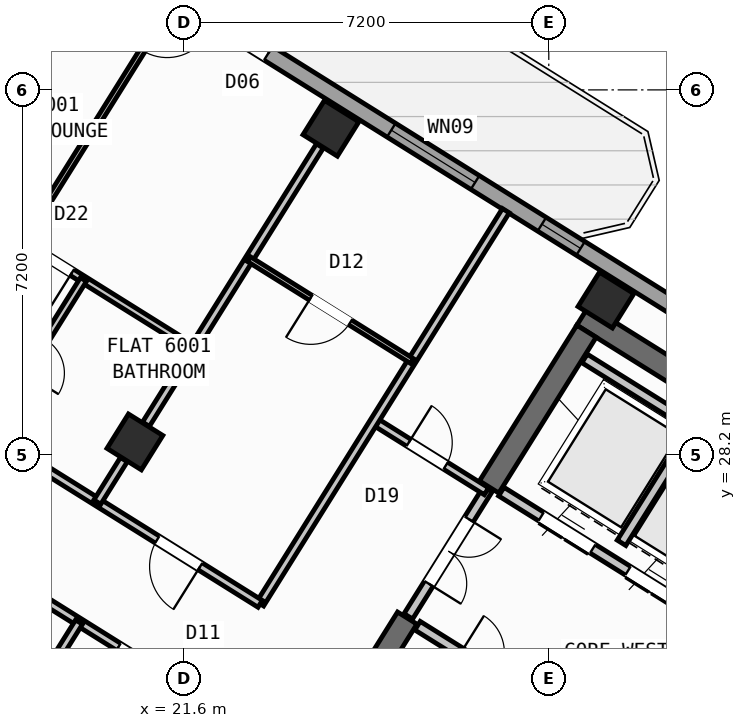
"""IFC4 building model, lengths in metres.
Left out: names, types, materials, properties, quantities, classifications, styles, units other than length and angle.
Written with IfcOpenShell. Run it as: python <this file> out.ifc"""

import sys

from ifc_helpers import new_model, si_unit, direction, frame, frame_2d, origin, origin_2d, place, context, subcontext, project, spatial, rectangle, hollow_rectangle, extrude, source, transform, mapped, element, fill, save


model = new_model("IFC4")
c1 = context("Model", 3, precision=1e-05, world=origin(), true_north=direction((0.0, 1.0)))
c2 = subcontext(c1, "Body", "Model", "MODEL_VIEW")
j1 = project(units=[si_unit("LENGTHUNIT", "METRE"), si_unit("PLANEANGLEUNIT", "RADIAN")], contexts=[c1])
p1 = place(None, origin())
s1 = spatial("IfcSite", under=j1, at=p1, CompositionType="ELEMENT")
p2 = place(p1, origin())
s2 = spatial("IfcBuilding", under=s1, at=p2, CompositionType="ELEMENT")
p3 = place(p2, frame((0.0, 0.0, 238.5)))
s3 = spatial("IfcBuildingStorey", under=s2, at=p3, CompositionType="ELEMENT", Elevation=238.5)
p4 = place(p3, frame((40.531, 24.036, 0.0), z_axis=(0.0, 0.0, 1.0), x_axis=(-0.848048787466, 0.529918157905, 0.0)))
e1 = element("IfcWall", 1, at=p4, inside=s3, PredefinedType="SHEAR", context=c2, shape_type="SweptSolid", body=[
    extrude(rectangle(XDim=13.04, YDim=0.45, at=frame_2d((6.52, 0.0))), origin(), (0.0, 0.0, 1.0), 3.35),
])
p5 = place(p3, frame((29.544, 30.636, 0.0), z_axis=(0.0, 0.0, 1.0), x_axis=(-0.529902075036, -0.848058836916, 0.0)))
e2 = element("IfcWall", 2, at=p5, inside=s3, PredefinedType="SHEAR", context=c2, shape_type="SweptSolid", body=[
    extrude(rectangle(XDim=3.625, YDim=0.45, at=frame_2d((1.812, 0.0))), origin(), (0.0, 0.0, 1.0), 3.35),
])
p6 = place(p3, frame((26.007, 24.976, 0.0), z_axis=(0.0, 0.0, 1.0), x_axis=(-0.529931155655, -0.848040665456, 0.0)))
e3 = element("IfcWall", 3, at=p6, inside=s3, PredefinedType="SHEAR", context=c2, shape_type="SweptSolid", body=[
    extrude(rectangle(XDim=6.475, YDim=0.45, at=frame_2d((3.238, 0.0))), origin(), (0.0, 0.0, 1.0), 3.35),
])
m1 = source(origin(), c2, "Body", "SweptSolid", [
    extrude(hollow_rectangle(XDim=0.8, YDim=0.8, WallThickness=0.032, at=origin_2d()), origin(), (0.0, 0.0, 1.0), 3.6),
])
for number, where, z_axis, x_axis in (
    (4, (29.928, 31.251, 0.0), (0.0, 0.0, 1.0), (-0.848, 0.53, 0.0)),
    (5, (24.5, 34.643, 0.0), (0.0, 0.0, 1.0), (-0.848, 0.53, 0.0)),
    (6, (20.632, 28.452, 0.0), (0.0, 0.0, 1.0), (-0.848, 0.53, 0.0)),
):
    element("IfcColumn", number, at=place(p3, frame(where, z_axis=z_axis, x_axis=x_axis)), inside=s3, PredefinedType="COLUMN", context=c2, shape_type="MappedRepresentation", body=[
        mapped(m1, transform((0.0, 0.0, 0.0), scale=1.0)),
    ])
p7 = place(p3, frame((14.138, 41.825, 0.0), z_axis=(0.0, 0.0, 1.0), x_axis=(0.848046498049, -0.529921821731, 0.0)))
e7 = element("IfcWall", 7, at=p7, inside=s3, PredefinedType="STANDARD", context=c2, shape_type="SweptSolid", body=[
    extrude(rectangle(XDim=31.588, YDim=0.32, at=frame_2d((15.794, 0.0))), origin(), (0.0, 0.0, 1.0), 3.35),
])
p8 = place(p7, frame((9.712, 0.0, 0.0)))
e8 = element("IfcOpeningElement", 8, at=p8, cuts=e7, PredefinedType="OPENING", context=c2, shape_type="SweptSolid", body=[
    extrude(rectangle(XDim=1.05, YDim=2.15, at=frame_2d((0.525, 1.075))), frame((0.0, 0.17, 0.0), z_axis=(0.0, -1.0, 0.0), x_axis=(1.0, 0.0, 0.0)), (0.0, 0.0, 1.0), 0.34),
])
p9 = place(p7, frame((0.841, 0.0, 0.9)))
e9 = element("IfcOpeningElement", 9, at=p9, cuts=e7, PredefinedType="OPENING", context=c2, shape_type="SweptSolid", body=[
    extrude(rectangle(XDim=1.65, YDim=1.45, at=frame_2d((0.825, 0.725))), frame((0.0, 0.17, 0.0), z_axis=(0.0, -1.0, 0.0), x_axis=(1.0, 0.0, 0.0)), (0.0, 0.0, 1.0), 0.34),
])
p10 = place(p7, frame((4.171, 0.0, 1.0)))
e10 = element("IfcOpeningElement", 10, at=p10, cuts=e7, PredefinedType="OPENING", context=c2, shape_type="SweptSolid", body=[
    extrude(rectangle(XDim=0.9, YDim=1.25, at=frame_2d((0.45, 0.625))), frame((0.0, 0.17, 0.0), z_axis=(0.0, -1.0, 0.0), x_axis=(1.0, 0.0, 0.0)), (0.0, 0.0, 1.0), 0.34),
])
p11 = place(p7, frame((13.624, 0.0, 0.95)))
e11 = element("IfcOpeningElement", 11, at=p11, cuts=e7, PredefinedType="OPENING", context=c2, shape_type="SweptSolid", body=[
    extrude(rectangle(XDim=1.95, YDim=1.35, at=frame_2d((0.975, 0.675))), frame((0.0, 0.17, 0.0), z_axis=(0.0, -1.0, 0.0), x_axis=(1.0, 0.0, 0.0)), (0.0, 0.0, 1.0), 0.34),
])
p12 = place(p7, frame((17.129, 0.0, 1.0)))
e12 = element("IfcOpeningElement", 12, at=p12, cuts=e7, PredefinedType="OPENING", context=c2, shape_type="SweptSolid", body=[
    extrude(rectangle(XDim=0.9, YDim=1.25, at=frame_2d((0.45, 0.625))), frame((0.0, 0.17, 0.0), z_axis=(0.0, -1.0, 0.0), x_axis=(1.0, 0.0, 0.0)), (0.0, 0.0, 1.0), 0.34),
])
p13 = place(p7, frame((21.744, 0.0, 0.9)))
e13 = element("IfcOpeningElement", 13, at=p13, cuts=e7, PredefinedType="OPENING", context=c2, shape_type="SweptSolid", body=[
    extrude(rectangle(XDim=1.65, YDim=1.45, at=frame_2d((0.825, 0.725))), frame((0.0, 0.17, 0.0), z_axis=(0.0, -1.0, 0.0), x_axis=(1.0, 0.0, 0.0)), (0.0, 0.0, 1.0), 0.34),
])
p14 = place(p7, frame((27.394, 0.0, 0.9)))
e14 = element("IfcOpeningElement", 14, at=p14, cuts=e7, PredefinedType="OPENING", context=c2, shape_type="SweptSolid", body=[
    extrude(rectangle(XDim=1.65, YDim=1.45, at=frame_2d((0.825, 0.725))), frame((0.0, 0.17, 0.0), z_axis=(0.0, -1.0, 0.0), x_axis=(1.0, 0.0, 0.0)), (0.0, 0.0, 1.0), 0.34),
])
p15 = place(p3, frame((31.822, 24.998, 0.0), z_axis=(0.0, 0.0, 1.0), x_axis=(-0.848054125777, 0.529909614701, 0.0)))
e15 = element("IfcWall", 15, at=p15, inside=s3, PredefinedType="STANDARD", context=c2, shape_type="SweptSolid", body=[
    extrude(rectangle(XDim=4.668, YDim=0.2, at=frame_2d((2.334, 0.0))), origin(), (0.0, 0.0, 1.0), 3.34),
])
p16 = place(p15, frame((0.52, 0.0, 0.0)))
e16 = element("IfcOpeningElement", 16, at=p16, cuts=e15, PredefinedType="OPENING", context=c2, shape_type="SweptSolid", body=[
    extrude(rectangle(XDim=1.2, YDim=2.15, at=frame_2d((0.6, 1.075))), frame((0.0, 0.11, 0.0), z_axis=(0.0, -1.0, 0.0), x_axis=(1.0, 0.0, 0.0)), (0.0, 0.0, 1.0), 0.22),
])
p17 = place(p15, frame((2.54, 0.0, 0.0)))
e17 = element("IfcOpeningElement", 17, at=p17, cuts=e15, PredefinedType="OPENING", context=c2, shape_type="SweptSolid", body=[
    extrude(rectangle(XDim=1.2, YDim=2.15, at=frame_2d((0.6, 1.075))), frame((0.0, 0.11, 0.0), z_axis=(0.0, -1.0, 0.0), x_axis=(1.0, 0.0, 0.0)), (0.0, 0.0, 1.0), 0.22),
])
p18 = place(p3, frame((31.645, 28.716, 0.0), z_axis=(0.0, 0.0, 1.0), x_axis=(-0.52986693015, -0.848080795876, 0.0)))
e18 = element("IfcWall", 18, at=p18, inside=s3, PredefinedType="STANDARD", context=c2, shape_type="SweptSolid", body=[
    extrude(rectangle(XDim=2.66, YDim=0.2, at=frame_2d((1.33, 0.0))), origin(), (0.0, 0.0, 1.0), 3.34),
])
p19 = place(p3, frame((33.363, 27.69, 0.0), z_axis=(0.0, 0.0, 1.0), x_axis=(-0.84804957148, 0.529916903215, 0.0)))
e19 = element("IfcWall", 19, at=p19, inside=s3, PredefinedType="STANDARD", context=c2, shape_type="SweptSolid", body=[
    extrude(rectangle(XDim=4.548, YDim=0.2, at=frame_2d((2.274, 0.0))), origin(), (0.0, 0.0, 1.0), 3.34),
])
p20 = place(p3, frame((31.525, 21.504, 0.0), z_axis=(0.0, 0.0, 1.0), x_axis=(-0.848042066329, 0.529928913853, 0.0)))
e20 = element("IfcWall", 20, at=p20, inside=s3, PredefinedType="STANDARD", context=c2, shape_type="SweptSolid", body=[
    extrude(rectangle(XDim=6.268, YDim=0.2, at=frame_2d((3.134, 0.0))), origin(), (0.0, 0.0, 1.0), 3.34),
])
p21 = place(p20, frame((4.4, 0.0, 0.0)))
e21 = element("IfcOpeningElement", 21, at=p21, cuts=e20, PredefinedType="OPENING", context=c2, shape_type="SweptSolid", body=[
    extrude(rectangle(XDim=0.86, YDim=2.05, at=frame_2d((0.43, 1.025))), frame((0.0, 0.11, 0.0), z_axis=(0.0, -1.0, 0.0), x_axis=(1.0, 0.0, 0.0)), (0.0, 0.0, 1.0), 0.22),
])
p22 = place(p20, frame((0.35, 0.0, 0.0)))
e22 = element("IfcOpeningElement", 22, at=p22, cuts=e20, PredefinedType="OPENING", context=c2, shape_type="SweptSolid", body=[
    extrude(rectangle(XDim=0.86, YDim=2.05, at=frame_2d((0.43, 1.025))), frame((0.0, 0.11, 0.0), z_axis=(0.0, -1.0, 0.0), x_axis=(1.0, 0.0, 0.0)), (0.0, 0.0, 1.0), 0.22),
])
p23 = place(p3, frame((27.596, 27.52, 0.0), z_axis=(0.0, 0.0, 1.0), x_axis=(-0.529865479138, -0.848081702443, 0.0)))
e23 = element("IfcWall", 23, at=p23, inside=s3, PredefinedType="STANDARD", context=c2, shape_type="SweptSolid", body=[
    extrude(rectangle(XDim=2.96, YDim=0.2, at=frame_2d((1.48, 0.0))), origin(), (0.0, 0.0, 1.0), 3.34),
])
p24 = place(p23, frame((0.7, 0.0, 0.0)))
e24 = element("IfcOpeningElement", 24, at=p24, cuts=e23, PredefinedType="OPENING", context=c2, shape_type="SweptSolid", body=[
    extrude(rectangle(XDim=1.5, YDim=2.15, at=frame_2d((0.75, 1.075))), frame((0.0, 0.11, 0.0), z_axis=(0.0, -1.0, 0.0), x_axis=(1.0, 0.0, 0.0)), (0.0, 0.0, 1.0), 0.22),
])
p25 = place(p3, frame((27.57, 27.478, 0.0), z_axis=(0.0, 0.0, 1.0), x_axis=(-0.848050851465, 0.529914854792, 0.0)))
e25 = element("IfcWall", 25, at=p25, inside=s3, PredefinedType="PARTITIONING", context=c2, shape_type="SweptSolid", body=[
    extrude(rectangle(XDim=2.61, YDim=0.16, at=frame_2d((1.305, 0.0))), origin(), (0.0, 0.0, 1.0), 3.34),
])
p26 = place(p25, frame((0.95, 0.0, 0.0)))
e26 = element("IfcOpeningElement", 26, at=p26, cuts=e25, PredefinedType="OPENING", context=c2, shape_type="SweptSolid", body=[
    extrude(rectangle(XDim=0.86, YDim=2.05, at=frame_2d((0.43, 1.025))), frame((0.0, 0.09, 0.0), z_axis=(0.0, -1.0, 0.0), x_axis=(1.0, 0.0, 0.0)), (0.0, 0.0, 1.0), 0.18),
])
p27 = place(p3, frame((27.953, 33.016, 0.0), z_axis=(0.0, 0.0, 1.0), x_axis=(-0.529903001606, -0.848058257957, 0.0)))
e27 = element("IfcWall", 27, at=p27, inside=s3, PredefinedType="PARTITIONING", context=c2, shape_type="SweptSolid", body=[
    extrude(rectangle(XDim=9.15, YDim=0.16, at=frame_2d((4.575, 0.0))), origin(), (0.0, 0.0, 1.0), 3.34),
])
p28 = place(p3, frame((23.104, 25.256, 0.0), z_axis=(0.0, 0.0, 1.0), x_axis=(-0.848041752158, 0.529929416617, 0.0)))
e28 = element("IfcWall", 28, at=p28, inside=s3, PredefinedType="PARTITIONING", context=c2, shape_type="SweptSolid", body=[
    extrude(rectangle(XDim=16.73, YDim=0.16, at=frame_2d((8.365, 0.0))), origin(), (0.0, 0.0, 1.0), 3.34),
])
p29 = place(p28, frame((1.395, 0.0, 0.0)))
e29 = element("IfcOpeningElement", 29, at=p29, cuts=e28, PredefinedType="OPENING", context=c2, shape_type="SweptSolid", body=[
    extrude(rectangle(XDim=1.0, YDim=2.1, at=frame_2d((0.5, 1.05))), frame((0.0, 0.09, 0.0), z_axis=(0.0, -1.0, 0.0), x_axis=(1.0, 0.0, 0.0)), (0.0, 0.0, 1.0), 0.18),
])
p30 = place(p28, frame((7.82, 0.0, 0.0)))
e30 = element("IfcOpeningElement", 30, at=p30, cuts=e28, PredefinedType="OPENING", context=c2, shape_type="SweptSolid", body=[
    extrude(rectangle(XDim=1.0, YDim=2.1, at=frame_2d((0.5, 1.05))), frame((0.0, 0.09, 0.0), z_axis=(0.0, -1.0, 0.0), x_axis=(1.0, 0.0, 0.0)), (0.0, 0.0, 1.0), 0.18),
])
p31 = place(p28, frame((11.14, 0.0, 0.0)))
e31 = element("IfcOpeningElement", 31, at=p31, cuts=e28, PredefinedType="OPENING", context=c2, shape_type="SweptSolid", body=[
    extrude(rectangle(XDim=1.0, YDim=2.1, at=frame_2d((0.5, 1.05))), frame((0.0, 0.09, 0.0), z_axis=(0.0, -1.0, 0.0), x_axis=(1.0, 0.0, 0.0)), (0.0, 0.0, 1.0), 0.18),
])
p32 = place(p3, frame((21.938, 23.391, 0.0), z_axis=(0.0, 0.0, 1.0), x_axis=(-0.848045850158, 0.529922858565, 0.0)))
e32 = element("IfcWall", 32, at=p32, inside=s3, PredefinedType="PARTITIONING", context=c2, shape_type="SweptSolid", body=[
    extrude(rectangle(XDim=16.73, YDim=0.16, at=frame_2d((8.365, 0.0))), origin(), (0.0, 0.0, 1.0), 3.34),
])
p33 = place(p32, frame((0.92, 0.0, 0.0)))
e33 = element("IfcOpeningElement", 33, at=p33, cuts=e32, PredefinedType="OPENING", context=c2, shape_type="SweptSolid", body=[
    extrude(rectangle(XDim=1.0, YDim=2.1, at=frame_2d((0.5, 1.05))), frame((0.0, 0.09, 0.0), z_axis=(0.0, -1.0, 0.0), x_axis=(1.0, 0.0, 0.0)), (0.0, 0.0, 1.0), 0.18),
])
p34 = place(p32, frame((3.928, 0.0, 0.0)))
e34 = element("IfcOpeningElement", 34, at=p34, cuts=e32, PredefinedType="OPENING", context=c2, shape_type="SweptSolid", body=[
    extrude(rectangle(XDim=1.0, YDim=2.1, at=frame_2d((0.5, 1.05))), frame((0.0, 0.09, 0.0), z_axis=(0.0, -1.0, 0.0), x_axis=(1.0, 0.0, 0.0)), (0.0, 0.0, 1.0), 0.18),
])
p35 = place(p32, frame((7.271, 0.0, 0.0)))
e35 = element("IfcOpeningElement", 35, at=p35, cuts=e32, PredefinedType="OPENING", context=c2, shape_type="SweptSolid", body=[
    extrude(rectangle(XDim=1.0, YDim=2.1, at=frame_2d((0.5, 1.05))), frame((0.0, 0.09, 0.0), z_axis=(0.0, -1.0, 0.0), x_axis=(1.0, 0.0, 0.0)), (0.0, 0.0, 1.0), 0.18),
])
p36 = place(p32, frame((10.78, 0.0, 0.0)))
e36 = element("IfcOpeningElement", 36, at=p36, cuts=e32, PredefinedType="OPENING", context=c2, shape_type="SweptSolid", body=[
    extrude(rectangle(XDim=1.0, YDim=2.1, at=frame_2d((0.5, 1.05))), frame((0.0, 0.09, 0.0), z_axis=(0.0, -1.0, 0.0), x_axis=(1.0, 0.0, 0.0)), (0.0, 0.0, 1.0), 0.18),
])
p37 = place(p32, frame((14.372, 0.0, 0.0)))
e37 = element("IfcOpeningElement", 37, at=p37, cuts=e32, PredefinedType="OPENING", context=c2, shape_type="SweptSolid", body=[
    extrude(rectangle(XDim=1.0, YDim=2.1, at=frame_2d((0.5, 1.05))), frame((0.0, 0.09, 0.0), z_axis=(0.0, -1.0, 0.0), x_axis=(1.0, 0.0, 0.0)), (0.0, 0.0, 1.0), 0.18),
])
p38 = place(p3, frame((19.529, 24.896, 0.0), z_axis=(0.0, 0.0, 1.0), x_axis=(-0.529914125013, -0.848051307476, 0.0)))
e38 = element("IfcWall", 38, at=p38, inside=s3, PredefinedType="PARTITIONING", context=c2, shape_type="SweptSolid", body=[
    extrude(rectangle(XDim=10.35, YDim=0.16, at=frame_2d((5.175, 0.0))), origin(), (0.0, 0.0, 1.0), 3.34),
])
p39 = place(p3, frame((24.282, 34.293, 0.0), z_axis=(0.0, 0.0, 1.0), x_axis=(-0.529934553702, -0.848038542045, 0.0)))
e39 = element("IfcWall", 39, at=p39, inside=s3, PredefinedType="PARTITIONING", context=c2, shape_type="SweptSolid", body=[
    extrude(rectangle(XDim=6.476, YDim=0.16, at=frame_2d((3.238, 0.0))), origin(), (0.0, 0.0, 1.0), 2.875),
])
p40 = place(p3, frame((20.414, 28.103, 0.0), z_axis=(0.0, 0.0, 1.0), x_axis=(-0.529998940003, -0.847998304005, 0.0)))
e40 = element("IfcWall", 40, at=p40, inside=s3, PredefinedType="PARTITIONING", context=c2, shape_type="SweptSolid", body=[
    extrude(rectangle(XDim=0.988, YDim=0.16, at=frame_2d((0.494, 0.0))), origin(), (0.0, 0.0, 1.0), 2.875),
])
p41 = place(p3, frame((26.099, 30.05, 0.0), z_axis=(0.0, 0.0, 1.0), x_axis=(-0.84803087207, 0.529946827537, 0.0)))
e41 = element("IfcWall", 41, at=p41, inside=s3, PredefinedType="PARTITIONING", context=c2, shape_type="SweptSolid", body=[
    extrude(rectangle(XDim=3.79, YDim=0.11, at=frame_2d((1.895, 0.0))), origin(), (0.0, 0.0, 1.0), 3.34),
])
p42 = place(p41, frame((1.435, 0.0, 0.0)))
e42 = element("IfcOpeningElement", 42, at=p42, cuts=e41, PredefinedType="OPENING", context=c2, shape_type="SweptSolid", body=[
    extrude(rectangle(XDim=0.92, YDim=2.08, at=frame_2d((0.46, 1.04))), frame((0.0, 0.065, 0.0), z_axis=(0.0, -1.0, 0.0), x_axis=(1.0, 0.0, 0.0)), (0.0, 0.0, 1.0), 0.13),
])
p43 = place(p3, frame((21.787, 30.301, 0.0), z_axis=(0.0, 0.0, 1.0), x_axis=(-0.848049732085, 0.529916646191, 0.0)))
e43 = element("IfcWall", 43, at=p43, inside=s3, PredefinedType="PLUMBINGWALL", context=c2, shape_type="SweptSolid", body=[
    extrude(rectangle(XDim=6.4, YDim=0.14, at=frame_2d((3.2, 0.0))), origin(), (0.0, 0.0, 1.0), 3.34),
])
p44 = place(p43, frame((2.824, 0.0, 0.0)))
e44 = element("IfcOpeningElement", 44, at=p44, cuts=e43, PredefinedType="OPENING", context=c2, shape_type="SweptSolid", body=[
    extrude(rectangle(XDim=0.78, YDim=2.05, at=frame_2d((0.39, 1.025))), frame((0.0, 0.08, 0.0), z_axis=(0.0, -1.0, 0.0), x_axis=(1.0, 0.0, 0.0)), (0.0, 0.0, 1.0), 0.16),
])
p45 = place(p3, frame((19.616, 31.657, 0.0), z_axis=(0.0, 0.0, 1.0), x_axis=(-0.529876336437, -0.84807491891, 0.0)))
e45 = element("IfcWall", 45, at=p45, inside=s3, PredefinedType="PLUMBINGWALL", context=c2, shape_type="SweptSolid", body=[
    extrude(rectangle(XDim=3.58, YDim=0.14, at=frame_2d((1.79, 0.0))), origin(), (0.0, 0.0, 1.0), 3.34),
])
p46 = place(p45, frame((1.4, 0.0, 0.0)))
e46 = element("IfcOpeningElement", 46, at=p46, cuts=e45, PredefinedType="OPENING", context=c2, shape_type="SweptSolid", body=[
    extrude(rectangle(XDim=0.78, YDim=2.05, at=frame_2d((0.39, 1.025))), frame((0.0, 0.08, 0.0), z_axis=(0.0, -1.0, 0.0), x_axis=(1.0, 0.0, 0.0)), (0.0, 0.0, 1.0), 0.16),
])
p47 = place(p3, frame((21.517, 37.356, 0.0), z_axis=(0.0, 0.0, 1.0), x_axis=(-0.529916267533, -0.848049968695, 0.0)))
e47 = element("IfcWall", 47, at=p47, inside=s3, PredefinedType="PARTITIONING", context=c2, shape_type="SweptSolid", body=[
    extrude(rectangle(XDim=5.84, YDim=0.11, at=frame_2d((2.92, 0.0))), origin(), (0.0, 0.0, 1.0), 3.34),
])
p48 = place(p47, frame((0.47, 0.0, 0.0)))
e48 = element("IfcOpeningElement", 48, at=p48, cuts=e47, PredefinedType="OPENING", context=c2, shape_type="SweptSolid", body=[
    extrude(rectangle(XDim=0.92, YDim=2.08, at=frame_2d((0.46, 1.04))), frame((0.0, 0.065, 0.0), z_axis=(0.0, -1.0, 0.0), x_axis=(1.0, 0.0, 0.0)), (0.0, 0.0, 1.0), 0.13),
])
m2 = source(origin(), c2, "Body", "SweptSolid", [
    extrude(rectangle(XDim=1.05, YDim=2.15, at=frame_2d((0.525, 1.075))), frame((0.0, 0.025, 0.0), z_axis=(0.0, -1.0, 0.0), x_axis=(1.0, 0.0, 0.0)), (0.0, 0.0, 1.0), 0.05),
])
p49 = place(p8, origin())
e49 = element("IfcDoor", 49, at=p49, inside=s3, OperationType="SINGLE_SWING_RIGHT", PredefinedType="DOOR", context=c2, shape_type="MappedRepresentation", body=[
    mapped(m2, transform((0.0, 0.0, 0.0), scale=1.0)),
])
fill(e8, e49)
m3 = source(origin(), c2, "Body", "SweptSolid", [
    extrude(rectangle(XDim=1.95, YDim=1.35, at=frame_2d((0.975, 0.675))), frame((0.0, 0.03, 0.0), z_axis=(0.0, -1.0, 0.0), x_axis=(1.0, 0.0, 0.0)), (0.0, 0.0, 1.0), 0.06),
])
p50 = place(p11, origin())
e50 = element("IfcWindow", 50, at=p50, inside=s3, PartitioningType="SINGLE_PANEL", PredefinedType="WINDOW", context=c2, shape_type="MappedRepresentation", body=[
    mapped(m3, transform((0.0, 0.0, 0.0), scale=1.0)),
])
fill(e11, e50)
m4 = source(origin(), c2, "Body", "SweptSolid", [
    extrude(rectangle(XDim=0.9, YDim=1.25, at=frame_2d((0.45, 0.625))), frame((0.0, 0.03, 0.0), z_axis=(0.0, -1.0, 0.0), x_axis=(1.0, 0.0, 0.0)), (0.0, 0.0, 1.0), 0.06),
])
p51 = place(p12, origin())
e51 = element("IfcWindow", 51, at=p51, inside=s3, PartitioningType="SINGLE_PANEL", PredefinedType="WINDOW", context=c2, shape_type="MappedRepresentation", body=[
    mapped(m4, transform((0.0, 0.0, 0.0), scale=1.0)),
])
fill(e12, e51)
m5 = source(origin(), c2, "Body", "SweptSolid", [
    extrude(rectangle(XDim=1.2, YDim=2.15, at=frame_2d((0.6, 1.075))), frame((0.0, 0.025, 0.0), z_axis=(0.0, -1.0, 0.0), x_axis=(1.0, 0.0, 0.0)), (0.0, 0.0, 1.0), 0.05),
])
p52 = place(p16, origin())
e52 = element("IfcDoor", 52, at=p52, inside=s3, OperationType="DOUBLE_DOOR_SLIDING", PredefinedType="DOOR", context=c2, shape_type="MappedRepresentation", body=[
    mapped(m5, transform((0.0, 0.0, 0.0), scale=1.0)),
])
fill(e16, e52)
p53 = place(p17, origin())
e53 = element("IfcDoor", 53, at=p53, inside=s3, OperationType="DOUBLE_DOOR_SLIDING", PredefinedType="DOOR", context=c2, shape_type="MappedRepresentation", body=[
    mapped(m5, transform((0.0, 0.0, 0.0), scale=1.0)),
])
fill(e17, e53)
m6 = source(origin(), c2, "Body", "SweptSolid", [
    extrude(rectangle(XDim=0.86, YDim=2.05, at=frame_2d((0.43, 1.025))), frame((0.0, 0.025, 0.0), z_axis=(0.0, -1.0, 0.0), x_axis=(1.0, 0.0, 0.0)), (0.0, 0.0, 1.0), 0.05),
])
p54 = place(p26, frame((0.86, 0.0, 0.0), z_axis=(0.0, 0.0, 1.0), x_axis=(-1.0, 0.0, 0.0)))
e54 = element("IfcDoor", 54, at=p54, inside=s3, OperationType="SINGLE_SWING_LEFT", PredefinedType="DOOR", context=c2, shape_type="MappedRepresentation", body=[
    mapped(m6, transform((0.0, 0.0, 0.0), scale=1.0)),
])
fill(e26, e54)
m7 = source(origin(), c2, "Body", "SweptSolid", [
    extrude(rectangle(XDim=1.5, YDim=2.15, at=frame_2d((0.75, 1.075))), frame((0.0, 0.025, 0.0), z_axis=(0.0, -1.0, 0.0), x_axis=(1.0, 0.0, 0.0)), (0.0, 0.0, 1.0), 0.05),
])
p55 = place(p24, origin())
e55 = element("IfcDoor", 55, at=p55, inside=s3, OperationType="DOUBLE_DOOR_SINGLE_SWING", PredefinedType="DOOR", context=c2, shape_type="MappedRepresentation", body=[
    mapped(m7, transform((0.0, 0.0, 0.0), scale=1.0)),
])
fill(e24, e55)
m8 = source(origin(), c2, "Body", "SweptSolid", [
    extrude(rectangle(XDim=1.0, YDim=2.1, at=frame_2d((0.5, 1.05))), frame((0.0, 0.025, 0.0), z_axis=(0.0, -1.0, 0.0), x_axis=(1.0, 0.0, 0.0)), (0.0, 0.0, 1.0), 0.05),
])
p56 = place(p33, origin())
e56 = element("IfcDoor", 56, at=p56, inside=s3, OperationType="SINGLE_SWING_RIGHT", PredefinedType="DOOR", context=c2, shape_type="MappedRepresentation", body=[
    mapped(m8, transform((0.0, 0.0, 0.0), scale=1.0)),
])
fill(e33, e56)
p57 = place(p29, origin())
e57 = element("IfcDoor", 57, at=p57, inside=s3, OperationType="SINGLE_SWING_LEFT", PredefinedType="DOOR", context=c2, shape_type="MappedRepresentation", body=[
    mapped(m8, transform((0.0, 0.0, 0.0), scale=1.0)),
])
fill(e29, e57)
m9 = source(origin(), c2, "Body", "SweptSolid", [
    extrude(rectangle(XDim=0.92, YDim=2.08, at=frame_2d((0.46, 1.04))), frame((0.0, 0.025, 0.0), z_axis=(0.0, -1.0, 0.0), x_axis=(1.0, 0.0, 0.0)), (0.0, 0.0, 1.0), 0.05),
])
p58 = place(p42, origin())
e58 = element("IfcDoor", 58, at=p58, inside=s3, OperationType="SINGLE_SWING_RIGHT", PredefinedType="DOOR", context=c2, shape_type="MappedRepresentation", body=[
    mapped(m9, transform((0.0, 0.0, 0.0), scale=1.0)),
])
fill(e42, e58)
m10 = source(origin(), c2, "Body", "SweptSolid", [
    extrude(rectangle(XDim=0.78, YDim=2.05, at=frame_2d((0.39, 1.025))), frame((0.0, 0.025, 0.0), z_axis=(0.0, -1.0, 0.0), x_axis=(1.0, 0.0, 0.0)), (0.0, 0.0, 1.0), 0.05),
])
p59 = place(p44, origin())
e59 = element("IfcDoor", 59, at=p59, inside=s3, OperationType="SINGLE_SWING_LEFT", PredefinedType="DOOR", context=c2, shape_type="MappedRepresentation", body=[
    mapped(m10, transform((0.0, 0.0, 0.0), scale=1.0)),
])
fill(e44, e59)
save(model, sys.argv[1])
